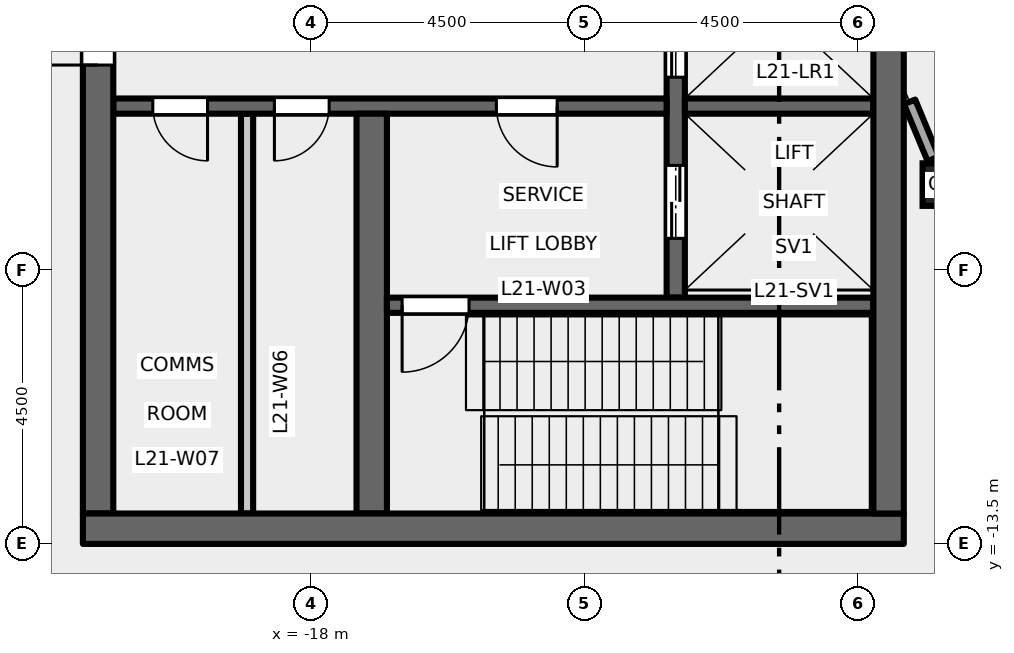
"""IFC4 building model, lengths in metres.
Left out: names, types, materials, properties, quantities, classifications, styles, units other than length and angle.
Written with IfcOpenShell. Run it as: python <this file> out.ifc"""

import sys

from ifc_helpers import new_model, si_unit, direction, frame, frame_2d, origin, origin_2d, place, context, subcontext, project, spatial, rectangle, hollow_rectangle, extrude, element, fill, save


model = new_model("IFC4")
c1 = context("Model", 3, precision=1e-05, world=origin(), true_north=direction((0.0, 1.0)))
c2 = subcontext(c1, "Body", "Model", "MODEL_VIEW")
j1 = project(units=[si_unit("LENGTHUNIT", "METRE"), si_unit("PLANEANGLEUNIT", "RADIAN")], contexts=[c1])
p1 = place(None, origin())
s1 = spatial("IfcSite", under=j1, at=p1, CompositionType="ELEMENT")
p2 = place(p1, origin())
s2 = spatial("IfcBuilding", under=s1, at=p2, CompositionType="ELEMENT")
p3 = place(p2, frame((0.0, 0.0, 99.2)))
s3 = spatial("IfcBuildingStorey", under=s2, at=p3, CompositionType="ELEMENT", Elevation=99.2)
p4 = place(p3, frame((-7.591, -7.591, 0.0), z_axis=(0.0, 0.0, 1.0), x_axis=(1.0, 0.0, 0.0)))
e1 = element("IfcColumn", 1, at=p4, inside=s3, PredefinedType="COLUMN", context=c2, shape_type="SweptSolid", body=[
    extrude(hollow_rectangle(XDim=0.7, YDim=0.7, WallThickness=0.04, at=origin_2d()), origin(), (0.0, 0.0, 1.0), 5.5),
])
p5 = place(p3, frame((-12.0, -9.45, 0.0), z_axis=(0.0, 0.0, 1.0), x_axis=(0.0, 1.0, 0.0)))
e2 = element("IfcWall", 2, at=p5, inside=s3, PredefinedType="SHEAR", context=c2, shape_type="SweptSolid", body=[
    extrude(rectangle(XDim=18.9, YDim=0.3, at=frame_2d((9.45, 0.0))), origin(), (0.0, 0.0, 1.0), 5.35),
])
p6 = place(p5, frame((3.625, 0.0, 0.0)))
e3 = element("IfcOpeningElement", 3, at=p6, cuts=e2, PredefinedType="OPENING", context=c2, shape_type="SweptSolid", body=[
    extrude(rectangle(XDim=1.1, YDim=2.1, at=frame_2d((0.55, 1.05))), frame((0.0, 0.16, 0.0), z_axis=(0.0, -1.0, 0.0), x_axis=(1.0, 0.0, 0.0)), (0.0, 0.0, 1.0), 0.32),
])
p7 = place(p5, frame((6.775, 0.0, 0.0)))
e4 = element("IfcOpeningElement", 4, at=p7, cuts=e2, PredefinedType="OPENING", context=c2, shape_type="SweptSolid", body=[
    extrude(rectangle(XDim=1.1, YDim=2.1, at=frame_2d((0.55, 1.05))), frame((0.0, 0.16, 0.0), z_axis=(0.0, -1.0, 0.0), x_axis=(1.0, 0.0, 0.0)), (0.0, 0.0, 1.0), 0.32),
])
p8 = place(p5, frame((9.925, 0.0, 0.0)))
e5 = element("IfcOpeningElement", 5, at=p8, cuts=e2, PredefinedType="OPENING", context=c2, shape_type="SweptSolid", body=[
    extrude(rectangle(XDim=1.1, YDim=2.1, at=frame_2d((0.55, 1.05))), frame((0.0, 0.16, 0.0), z_axis=(0.0, -1.0, 0.0), x_axis=(1.0, 0.0, 0.0)), (0.0, 0.0, 1.0), 0.32),
])
p9 = place(p5, frame((13.075, 0.0, 0.0)))
e6 = element("IfcOpeningElement", 6, at=p9, cuts=e2, PredefinedType="OPENING", context=c2, shape_type="SweptSolid", body=[
    extrude(rectangle(XDim=1.1, YDim=2.1, at=frame_2d((0.55, 1.05))), frame((0.0, 0.16, 0.0), z_axis=(0.0, -1.0, 0.0), x_axis=(1.0, 0.0, 0.0)), (0.0, 0.0, 1.0), 0.32),
])
p10 = place(p5, frame((16.725, 0.0, 0.0)))
e7 = element("IfcOpeningElement", 7, at=p10, cuts=e2, PredefinedType="OPENING", context=c2, shape_type="SweptSolid", body=[
    extrude(rectangle(XDim=1.2, YDim=2.1, at=frame_2d((0.6, 1.05))), frame((0.0, 0.16, 0.0), z_axis=(0.0, -1.0, 0.0), x_axis=(1.0, 0.0, 0.0)), (0.0, 0.0, 1.0), 0.32),
])
p11 = place(p5, frame((0.975, 0.0, 0.0)))
e8 = element("IfcOpeningElement", 8, at=p11, cuts=e2, PredefinedType="OPENING", context=c2, shape_type="SweptSolid", body=[
    extrude(rectangle(XDim=1.2, YDim=2.1, at=frame_2d((0.6, 1.05))), frame((0.0, 0.16, 0.0), z_axis=(0.0, -1.0, 0.0), x_axis=(1.0, 0.0, 0.0)), (0.0, 0.0, 1.0), 0.32),
])
p12 = place(p3, frame((-12.15, -6.3, 0.0), z_axis=(0.0, 0.0, 1.0), x_axis=(-1.0, 0.0, 0.0)))
e9 = element("IfcWall", 9, at=p12, inside=s3, PredefinedType="SHEAR", context=c2, shape_type="SweptSolid", body=[
    extrude(rectangle(XDim=9.1, YDim=0.25, at=frame_2d((4.55, 0.0))), origin(), (0.0, 0.0, 1.0), 5.35),
])
p13 = place(p12, frame((1.8, 0.0, 0.0)))
e10 = element("IfcOpeningElement", 10, at=p13, cuts=e9, PredefinedType="OPENING", context=c2, shape_type="SweptSolid", body=[
    extrude(rectangle(XDim=1.0, YDim=2.1, at=frame_2d((0.5, 1.05))), frame((0.0, 0.135, 0.0), z_axis=(0.0, -1.0, 0.0), x_axis=(1.0, 0.0, 0.0)), (0.0, 0.0, 1.0), 0.27),
])
p14 = place(p12, frame((5.55, 0.0, 0.0)))
e11 = element("IfcOpeningElement", 11, at=p14, cuts=e9, PredefinedType="OPENING", context=c2, shape_type="SweptSolid", body=[
    extrude(rectangle(XDim=0.9, YDim=2.1, at=frame_2d((0.45, 1.05))), frame((0.0, 0.135, 0.0), z_axis=(0.0, -1.0, 0.0), x_axis=(1.0, 0.0, 0.0)), (0.0, 0.0, 1.0), 0.27),
])
p15 = place(p12, frame((7.55, 0.0, 0.0)))
e12 = element("IfcOpeningElement", 12, at=p15, cuts=e9, PredefinedType="OPENING", context=c2, shape_type="SweptSolid", body=[
    extrude(rectangle(XDim=0.9, YDim=2.1, at=frame_2d((0.45, 1.05))), frame((0.0, 0.135, 0.0), z_axis=(0.0, -1.0, 0.0), x_axis=(1.0, 0.0, 0.0)), (0.0, 0.0, 1.0), 0.27),
])
p16 = place(p3, frame((-21.5, -13.0, 0.0), z_axis=(0.0, 0.0, 1.0), x_axis=(0.0, 1.0, 0.0)))
e13 = element("IfcWall", 13, at=p16, inside=s3, PredefinedType="SHEAR", context=c2, shape_type="SweptSolid", body=[
    extrude(rectangle(XDim=26.0, YDim=0.5, at=frame_2d((13.0, 0.0))), origin(), (0.0, 0.0, 1.0), 5.35),
])
p17 = place(p16, frame((16.825, 0.0, 0.0)))
e14 = element("IfcOpeningElement", 14, at=p17, cuts=e13, PredefinedType="OPENING", context=c2, shape_type="SweptSolid", body=[
    extrude(rectangle(XDim=1.8, YDim=2.1, at=frame_2d((0.9, 1.05))), frame((0.0, 0.26, 0.0), z_axis=(0.0, -1.0, 0.0), x_axis=(1.0, 0.0, 0.0)), (0.0, 0.0, 1.0), 0.52),
])
p18 = place(p16, frame((7.375, 0.0, 0.0)))
e15 = element("IfcOpeningElement", 15, at=p18, cuts=e13, PredefinedType="OPENING", context=c2, shape_type="SweptSolid", body=[
    extrude(rectangle(XDim=1.8, YDim=2.1, at=frame_2d((0.9, 1.05))), frame((0.0, 0.26, 0.0), z_axis=(0.0, -1.0, 0.0), x_axis=(1.0, 0.0, 0.0)), (0.0, 0.0, 1.0), 0.52),
])
p19 = place(p16, frame((23.8, 0.0, 0.0)))
e16 = element("IfcOpeningElement", 16, at=p19, cuts=e13, PredefinedType="OPENING", context=c2, shape_type="SweptSolid", body=[
    extrude(rectangle(XDim=0.9, YDim=2.1, at=frame_2d((0.45, 1.05))), frame((0.0, 0.26, 0.0), z_axis=(0.0, -1.0, 0.0), x_axis=(1.0, 0.0, 0.0)), (0.0, 0.0, 1.0), 0.52),
])
p20 = place(p3, frame((-19.05, -13.0, 0.0), z_axis=(0.0, 0.0, 1.0), x_axis=(0.0, 1.0, 0.0)))
e17 = element("IfcWall", 17, at=p20, inside=s3, PredefinedType="PARTITIONING", context=c2, shape_type="SweptSolid", body=[
    extrude(rectangle(XDim=6.575, YDim=0.2, at=frame_2d((3.288, 0.0))), origin(), (0.0, 0.0, 1.0), 5.35),
])
p21 = place(p3, frame((-17.0, -13.0, 0.0), z_axis=(0.0, 0.0, 1.0), x_axis=(0.0, 1.0, 0.0)))
e18 = element("IfcWall", 18, at=p21, inside=s3, PredefinedType="SHEAR", context=c2, shape_type="SweptSolid", body=[
    extrude(rectangle(XDim=6.575, YDim=0.5, at=frame_2d((3.288, 0.0))), origin(), (0.0, 0.0, 1.0), 5.35),
])
p22 = place(p3, frame((-8.75, -6.3, 0.0), z_axis=(0.0, 0.0, 1.0), x_axis=(-1.0, 0.0, 0.0)))
e19 = element("IfcWall", 19, at=p22, inside=s3, PredefinedType="SHEAR", context=c2, shape_type="SweptSolid", body=[
    extrude(rectangle(XDim=3.1, YDim=0.25, at=frame_2d((1.55, 0.0))), origin(), (0.0, 0.0, 1.0), 5.35),
])
p23 = place(p3, frame((-8.75, -9.575, 0.0), z_axis=(0.0, 0.0, 1.0), x_axis=(-1.0, 0.0, 0.0)))
e20 = element("IfcWall", 20, at=p23, inside=s3, PredefinedType="SHEAR", context=c2, shape_type="SweptSolid", body=[
    extrude(rectangle(XDim=8.0, YDim=0.25, at=frame_2d((4.0, 0.0))), origin(), (0.0, 0.0, 1.0), 5.35),
])
p24 = place(p23, frame((6.65, 0.0, 0.0)))
e21 = element("IfcOpeningElement", 21, at=p24, cuts=e20, PredefinedType="OPENING", context=c2, shape_type="SweptSolid", body=[
    extrude(rectangle(XDim=1.1, YDim=2.1, at=frame_2d((0.55, 1.05))), frame((0.0, 0.135, 0.0), z_axis=(0.0, -1.0, 0.0), x_axis=(1.0, 0.0, 0.0)), (0.0, 0.0, 1.0), 0.27),
])
p25 = place(p3, frame((-8.25, -13.25, 0.0), z_axis=(0.0, 0.0, 1.0), x_axis=(-1.0, 0.0, 0.0)))
e22 = element("IfcWall", 22, at=p25, inside=s3, PredefinedType="SHEAR", context=c2, shape_type="SweptSolid", body=[
    extrude(rectangle(XDim=13.5, YDim=0.5, at=frame_2d((6.75, 0.0))), origin(), (0.0, 0.0, 1.0), 5.35),
])
p26 = place(p3, frame((-8.5, -13.0, 0.0), z_axis=(0.0, 0.0, 1.0), x_axis=(0.0, 1.0, 0.0)))
e23 = element("IfcWall", 23, at=p26, inside=s3, PredefinedType="SHEAR", context=c2, shape_type="SweptSolid", body=[
    extrude(rectangle(XDim=26.0, YDim=0.5, at=frame_2d((13.0, 0.0))), origin(), (0.0, 0.0, 1.0), 5.35),
])
p27 = place(p3, frame((-8.154, -6.231, 0.0), z_axis=(0.0, 0.0, 1.0), x_axis=(0.382769662028, -0.923843810301, 0.0)))
e24 = element("IfcWall", 24, at=p27, inside=s3, PredefinedType="STANDARD", context=c2, shape_type="SweptSolid", body=[
    extrude(rectangle(XDim=1.015, YDim=0.2, at=frame_2d((0.507, 0.0))), origin(), (0.0, 0.0, 1.0), 4.826),
])
p28 = place(p13, origin())
e25 = element("IfcDoor", 25, at=p28, inside=s3, OperationType="SINGLE_SWING_RIGHT", PredefinedType="DOOR", context=c2, shape_type="SweptSolid", body=[
    extrude(rectangle(XDim=1.0, YDim=2.1, at=frame_2d((0.5, 1.05))), frame((0.0, 0.025, 0.0), z_axis=(0.0, -1.0, 0.0), x_axis=(1.0, 0.0, 0.0)), (0.0, 0.0, 1.0), 0.05),
])
fill(e10, e25)
p29 = place(p24, origin())
e26 = element("IfcDoor", 26, at=p29, inside=s3, OperationType="SINGLE_SWING_LEFT", PredefinedType="DOOR", context=c2, shape_type="SweptSolid", body=[
    extrude(rectangle(XDim=1.1, YDim=2.1, at=frame_2d((0.55, 1.05))), frame((0.0, 0.025, 0.0), z_axis=(0.0, -1.0, 0.0), x_axis=(1.0, 0.0, 0.0)), (0.0, 0.0, 1.0), 0.05),
])
fill(e21, e26)
p30 = place(p18, origin())
e27 = element("IfcDoor", 27, at=p30, inside=s3, OperationType="DOUBLE_DOOR_DOUBLE_SWING", PredefinedType="DOOR", context=c2, shape_type="SweptSolid", body=[
    extrude(rectangle(XDim=1.8, YDim=2.1, at=frame_2d((0.9, 1.05))), frame((0.0, 0.025, 0.0), z_axis=(0.0, -1.0, 0.0), x_axis=(1.0, 0.0, 0.0)), (0.0, 0.0, 1.0), 0.05),
])
fill(e15, e27)
p31 = place(p6, origin())
e28 = element("IfcDoor", 28, at=p31, inside=s3, OperationType="DOUBLE_DOOR_SLIDING", PredefinedType="DOOR", context=c2, shape_type="SweptSolid", body=[
    extrude(rectangle(XDim=1.1, YDim=2.1, at=frame_2d((0.55, 1.05))), frame((0.0, 0.025, 0.0), z_axis=(0.0, -1.0, 0.0), x_axis=(1.0, 0.0, 0.0)), (0.0, 0.0, 1.0), 0.05),
])
fill(e3, e28)
p32 = place(p11, origin())
e29 = element("IfcDoor", 29, at=p32, inside=s3, OperationType="DOUBLE_DOOR_SLIDING", PredefinedType="DOOR", context=c2, shape_type="SweptSolid", body=[
    extrude(rectangle(XDim=1.2, YDim=2.1, at=frame_2d((0.6, 1.05))), frame((0.0, 0.025, 0.0), z_axis=(0.0, -1.0, 0.0), x_axis=(1.0, 0.0, 0.0)), (0.0, 0.0, 1.0), 0.05),
])
fill(e8, e29)
p33 = place(p14, origin())
e30 = element("IfcDoor", 30, at=p33, inside=s3, OperationType="SINGLE_SWING_LEFT", PredefinedType="DOOR", context=c2, shape_type="SweptSolid", body=[
    extrude(rectangle(XDim=0.9, YDim=2.1, at=frame_2d((0.45, 1.05))), frame((0.0, 0.025, 0.0), z_axis=(0.0, -1.0, 0.0), x_axis=(1.0, 0.0, 0.0)), (0.0, 0.0, 1.0), 0.05),
])
fill(e11, e30)
p34 = place(p15, origin())
e31 = element("IfcDoor", 31, at=p34, inside=s3, OperationType="SINGLE_SWING_RIGHT", PredefinedType="DOOR", context=c2, shape_type="SweptSolid", body=[
    extrude(rectangle(XDim=0.9, YDim=2.1, at=frame_2d((0.45, 1.05))), frame((0.0, 0.025, 0.0), z_axis=(0.0, -1.0, 0.0), x_axis=(1.0, 0.0, 0.0)), (0.0, 0.0, 1.0), 0.05),
])
fill(e12, e31)
save(model, sys.argv[1])
